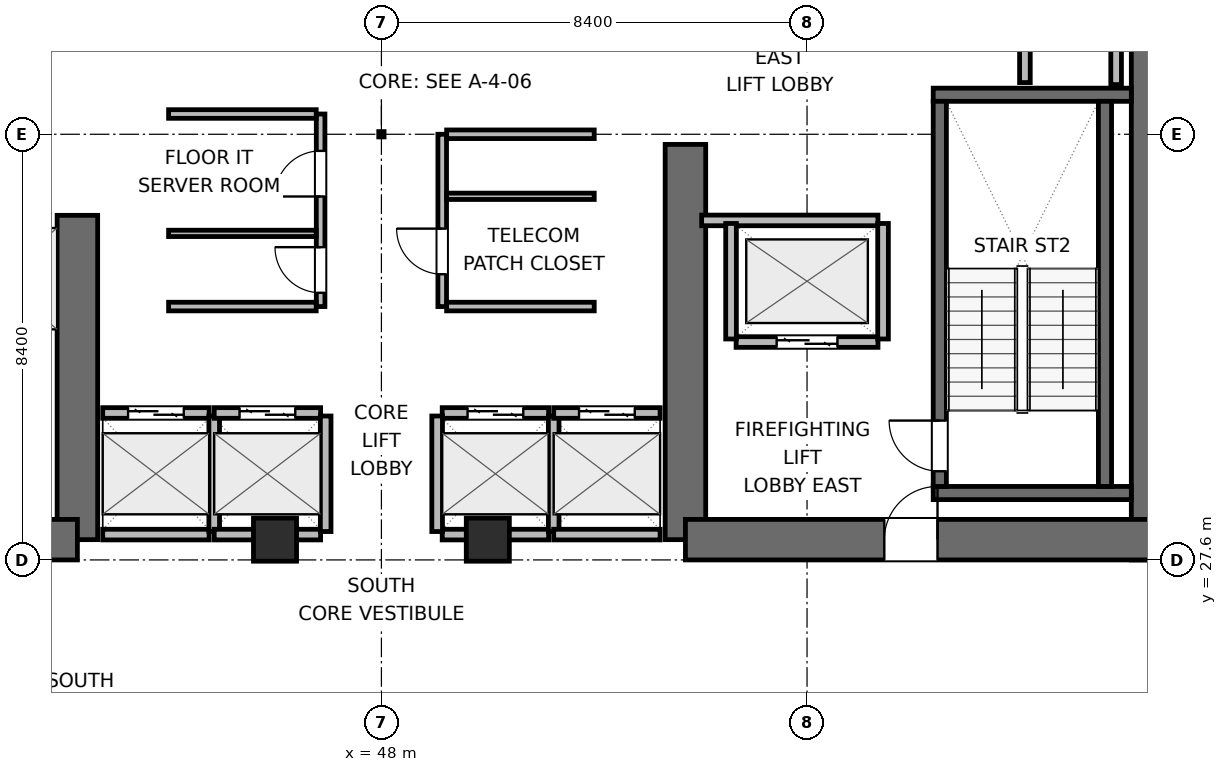
"""IFC4 building model, lengths in metres.
Left out: names, types, materials, properties, quantities, classifications, styles, units other than length and angle.
Written with IfcOpenShell. Run it as: python <this file> out.ifc"""

import sys

from ifc_helpers import new_model, si_unit, direction, frame, frame_2d, origin, origin_2d, place, context, subcontext, project, spatial, rectangle, extrude, element, fill, save


model = new_model("IFC4")
c1 = context("Model", 3, precision=1e-05, world=origin(), true_north=direction((0.0, 1.0)))
c2 = subcontext(c1, "Body", "Model", "MODEL_VIEW")
j1 = project(units=[si_unit("LENGTHUNIT", "METRE"), si_unit("PLANEANGLEUNIT", "RADIAN")], contexts=[c1])
p1 = place(None, origin())
s1 = spatial("IfcSite", under=j1, at=p1, CompositionType="ELEMENT")
p2 = place(p1, origin())
s2 = spatial("IfcBuilding", under=s1, at=p2, CompositionType="ELEMENT")
p3 = place(p2, frame((0.0, 0.0, 97.5)))
s3 = spatial("IfcBuildingStorey", under=s2, at=p3, CompositionType="ELEMENT", Elevation=97.5)
p4 = place(p3, frame((42.0, 28.0, 0.0), z_axis=(0.0, 0.0, 1.0), x_axis=(0.0, 1.0, 0.0)))
e1 = element("IfcWall", 1, at=p4, inside=s3, PredefinedType="SHEAR", context=c2, shape_type="SweptSolid", body=[
    extrude(rectangle(XDim=6.4, YDim=0.8, at=frame_2d((3.2, 0.0))), origin(), (0.0, 0.0, 1.0), 3.9),
])
p5 = place(p3, frame((32.8, 28.0, 0.0), z_axis=(0.0, 0.0, 1.0), x_axis=(1.0, 0.0, 0.0)))
e2 = element("IfcWall", 2, at=p5, inside=s3, PredefinedType="SHEAR", context=c2, shape_type="SweptSolid", body=[
    extrude(rectangle(XDim=9.2, YDim=0.8, at=frame_2d((4.6, 0.0))), origin(), (0.0, 0.0, 1.0), 3.9),
])
p6 = place(p5, frame((4.975, 0.0, 0.0)))
e3 = element("IfcOpeningElement", 3, at=p6, cuts=e2, PredefinedType="OPENING", context=c2, shape_type="SweptSolid", body=[
    extrude(rectangle(XDim=1.05, YDim=2.04, at=frame_2d((0.525, 1.02))), frame((0.0, 0.41, 0.0), z_axis=(0.0, -1.0, 0.0), x_axis=(1.0, 0.0, 0.0)), (0.0, 0.0, 1.0), 0.82),
])
p7 = place(p3, frame((54.0, 28.0, 0.0), z_axis=(0.0, 0.0, 1.0), x_axis=(0.0, 1.0, 0.0)))
e4 = element("IfcWall", 4, at=p7, inside=s3, PredefinedType="SHEAR", context=c2, shape_type="SweptSolid", body=[
    extrude(rectangle(XDim=7.8, YDim=0.8, at=frame_2d((3.9, 0.0))), origin(), (0.0, 0.0, 1.0), 3.9),
])
p8 = place(p3, frame((63.2, 27.6, 0.0), z_axis=(0.0, 0.0, 1.0), x_axis=(0.0, 1.0, 0.0)))
e5 = element("IfcWall", 5, at=p8, inside=s3, PredefinedType="SHEAR", context=c2, shape_type="SweptSolid", body=[
    extrude(rectangle(XDim=16.8, YDim=0.8, at=frame_2d((8.4, 0.0))), origin(), (0.0, 0.0, 1.0), 3.9),
])
p9 = place(p3, frame((54.0, 28.0, 0.0), z_axis=(0.0, 0.0, 1.0), x_axis=(1.0, 0.0, 0.0)))
e6 = element("IfcWall", 6, at=p9, inside=s3, PredefinedType="SHEAR", context=c2, shape_type="SweptSolid", body=[
    extrude(rectangle(XDim=9.2, YDim=0.8, at=frame_2d((4.6, 0.0))), origin(), (0.0, 0.0, 1.0), 3.9),
])
p10 = place(p9, frame((3.925, 0.0, 0.0)))
e7 = element("IfcOpeningElement", 7, at=p10, cuts=e6, PredefinedType="OPENING", context=c2, shape_type="SweptSolid", body=[
    extrude(rectangle(XDim=1.05, YDim=2.04, at=frame_2d((0.525, 1.02))), frame((0.0, 0.41, 0.0), z_axis=(0.0, -1.0, 0.0), x_axis=(1.0, 0.0, 0.0)), (0.0, 0.0, 1.0), 0.82),
])
for number, where, z_axis, x_axis in (
    (8, (58.89, 28.92, 0.0), (0.0, 0.0, 1.0), (1.0, 0.0, 0.0)),
    (9, (58.89, 36.78, 0.0), (0.0, 0.0, 1.0), (1.0, 0.0, 0.0)),
):
    element("IfcWall", number, at=place(p3, frame(where, z_axis=z_axis, x_axis=x_axis)), inside=s3, PredefinedType="SHEAR", context=c2, shape_type="SweptSolid", body=[
        extrude(rectangle(XDim=3.91, YDim=0.26, at=frame_2d((1.955, 0.0))), origin(), (0.0, 0.0, 1.0), 3.9),
    ])
p11 = place(p3, frame((59.02, 29.05, 0.0), z_axis=(0.0, 0.0, 1.0), x_axis=(0.0, 1.0, 0.0)))
e10 = element("IfcWall", 10, at=p11, inside=s3, PredefinedType="SHEAR", context=c2, shape_type="SweptSolid", body=[
    extrude(rectangle(XDim=7.6, YDim=0.26, at=frame_2d((3.8, 0.0))), origin(), (0.0, 0.0, 1.0), 3.9),
])
p12 = place(p11, frame((0.3, 0.0, 0.0)))
e11 = element("IfcOpeningElement", 11, at=p12, cuts=e10, PredefinedType="OPENING", context=c2, shape_type="SweptSolid", body=[
    extrude(rectangle(XDim=1.0, YDim=2.04, at=frame_2d((0.5, 1.02))), frame((0.0, 0.14, 0.0), z_axis=(0.0, -1.0, 0.0), x_axis=(1.0, 0.0, 0.0)), (0.0, 0.0, 1.0), 0.28),
])
p13 = place(p3, frame((62.28, 29.05, 0.0), z_axis=(0.0, 0.0, 1.0), x_axis=(0.0, 1.0, 0.0)))
e12 = element("IfcWall", 12, at=p13, inside=s3, PredefinedType="SHEAR", context=c2, shape_type="SweptSolid", body=[
    extrude(rectangle(XDim=7.6, YDim=0.26, at=frame_2d((3.8, 0.0))), origin(), (0.0, 0.0, 1.0), 3.9),
])
for number, where, z_axis, x_axis in (
    (13, (45.9, 28.0, 0.0), (0.0, 0.0, 1.0), (1.0, 0.0, 0.0)),
    (14, (50.1, 28.0, 0.0), (0.0, 0.0, 1.0), (1.0, 0.0, 0.0)),
):
    element("IfcColumn", number, at=place(p3, frame(where, z_axis=z_axis, x_axis=x_axis)), inside=s3, PredefinedType="COLUMN", context=c2, shape_type="SweptSolid", body=[
        extrude(rectangle(XDim=0.85, YDim=0.85, at=origin_2d()), origin(), (0.0, 0.0, 1.0), 3.9),
    ])
p14 = place(p3, frame((60.7, 37.02, 0.0), z_axis=(0.0, 0.0, 1.0), x_axis=(0.0, 1.0, 0.0)))
e15 = element("IfcWall", 15, at=p14, inside=s3, PredefinedType="PARTITIONING", context=c2, shape_type="SweptSolid", body=[
    extrude(rectangle(XDim=1.96, YDim=0.21, at=frame_2d((0.98, 0.0))), origin(), (0.0, 0.0, 1.0), 3.64),
])
p15 = place(p3, frame((62.5, 36.98, 0.0), z_axis=(0.0, 0.0, 1.0), x_axis=(0.0, 1.0, 0.0)))
e16 = element("IfcWall", 16, at=p15, inside=s3, PredefinedType="PARTITIONING", context=c2, shape_type="SweptSolid", body=[
    extrude(rectangle(XDim=2.04, YDim=0.21, at=frame_2d((1.02, 0.0))), origin(), (0.0, 0.0, 1.0), 3.64),
])
p16 = place(p3, frame((55.0, 31.9, 0.0), z_axis=(0.0, 0.0, 1.0), x_axis=(1.0, 0.0, 0.0)))
e17 = element("IfcWall", 17, at=p16, inside=s3, PredefinedType="PARTITIONING", context=c2, shape_type="SweptSolid", body=[
    extrude(rectangle(XDim=2.8, YDim=0.21, at=frame_2d((1.4, 0.0))), origin(), (0.0, 0.0, 1.0), 3.64),
])
p17 = place(p16, frame((0.8, 0.0, 0.0)))
e18 = element("IfcOpeningElement", 18, at=p17, cuts=e17, PredefinedType="OPENING", context=c2, shape_type="SweptSolid", body=[
    extrude(rectangle(XDim=1.2, YDim=2.04, at=frame_2d((0.6, 1.02))), frame((0.0, 0.115, 0.0), z_axis=(0.0, -1.0, 0.0), x_axis=(1.0, 0.0, 0.0)), (0.0, 0.0, 1.0), 0.23),
])
p18 = place(p3, frame((54.32, 34.3, 0.0), z_axis=(0.0, 0.0, 1.0), x_axis=(1.0, 0.0, 0.0)))
e19 = element("IfcWall", 19, at=p18, inside=s3, PredefinedType="PARTITIONING", context=c2, shape_type="SweptSolid", body=[
    extrude(rectangle(XDim=3.48, YDim=0.21, at=frame_2d((1.74, 0.0))), origin(), (0.0, 0.0, 1.0), 3.64),
])
for number, where, z_axis, x_axis in (
    (20, (54.9, 31.96, 0.0), (0.0, 0.0, 1.0), (0.0, 1.0, 0.0)),
    (21, (57.9, 31.96, 0.0), (0.0, 0.0, 1.0), (0.0, 1.0, 0.0)),
):
    element("IfcWall", number, at=place(p3, frame(where, z_axis=z_axis, x_axis=x_axis)), inside=s3, PredefinedType="PARTITIONING", context=c2, shape_type="SweptSolid", body=[
        extrude(rectangle(XDim=2.28, YDim=0.21, at=frame_2d((1.14, 0.0))), origin(), (0.0, 0.0, 1.0), 3.64),
    ])
p19 = place(p3, frame((42.5, 30.5, 0.0), z_axis=(0.0, 0.0, 1.0), x_axis=(1.0, 0.0, 0.0)))
e22 = element("IfcWall", 22, at=p19, inside=s3, PredefinedType="PARTITIONING", context=c2, shape_type="SweptSolid", body=[
    extrude(rectangle(XDim=2.1, YDim=0.21, at=frame_2d((1.05, 0.0))), origin(), (0.0, 0.0, 1.0), 3.64),
])
p20 = place(p19, frame((0.5, 0.0, 0.0)))
e23 = element("IfcOpeningElement", 23, at=p20, cuts=e22, PredefinedType="OPENING", context=c2, shape_type="SweptSolid", body=[
    extrude(rectangle(XDim=1.1, YDim=2.04, at=frame_2d((0.55, 1.02))), frame((0.0, 0.115, 0.0), z_axis=(0.0, -1.0, 0.0), x_axis=(1.0, 0.0, 0.0)), (0.0, 0.0, 1.0), 0.23),
])
p21 = place(p3, frame((42.5, 28.1, 0.0), z_axis=(0.0, 0.0, 1.0), x_axis=(1.0, 0.0, 0.0)))
e24 = element("IfcWall", 24, at=p21, inside=s3, PredefinedType="PARTITIONING", context=c2, shape_type="SweptSolid", body=[
    extrude(rectangle(XDim=2.1, YDim=0.21, at=frame_2d((1.05, 0.0))), origin(), (0.0, 0.0, 1.0), 2.525),
])
p22 = place(p3, frame((44.7, 28.16, 0.0), z_axis=(0.0, 0.0, 1.0), x_axis=(0.0, 1.0, 0.0)))
e25 = element("IfcWall", 25, at=p22, inside=s3, PredefinedType="PARTITIONING", context=c2, shape_type="SweptSolid", body=[
    extrude(rectangle(XDim=2.28, YDim=0.21, at=frame_2d((1.14, 0.0))), origin(), (0.0, 0.0, 1.0), 3.64),
])
p23 = place(p3, frame((44.7, 30.5, 0.0), z_axis=(0.0, 0.0, 1.0), x_axis=(1.0, 0.0, 0.0)))
e26 = element("IfcWall", 26, at=p23, inside=s3, PredefinedType="PARTITIONING", context=c2, shape_type="SweptSolid", body=[
    extrude(rectangle(XDim=2.1, YDim=0.21, at=frame_2d((1.05, 0.0))), origin(), (0.0, 0.0, 1.0), 3.64),
])
p24 = place(p23, frame((0.5, 0.0, 0.0)))
e27 = element("IfcOpeningElement", 27, at=p24, cuts=e26, PredefinedType="OPENING", context=c2, shape_type="SweptSolid", body=[
    extrude(rectangle(XDim=1.1, YDim=2.04, at=frame_2d((0.55, 1.02))), frame((0.0, 0.115, 0.0), z_axis=(0.0, -1.0, 0.0), x_axis=(1.0, 0.0, 0.0)), (0.0, 0.0, 1.0), 0.23),
])
p25 = place(p3, frame((44.7, 28.1, 0.0), z_axis=(0.0, 0.0, 1.0), x_axis=(1.0, 0.0, 0.0)))
e28 = element("IfcWall", 28, at=p25, inside=s3, PredefinedType="PARTITIONING", context=c2, shape_type="SweptSolid", body=[
    extrude(rectangle(XDim=2.1, YDim=0.21, at=frame_2d((1.05, 0.0))), origin(), (0.0, 0.0, 1.0), 2.525),
])
p26 = place(p3, frame((46.9, 28.16, 0.0), z_axis=(0.0, 0.0, 1.0), x_axis=(0.0, 1.0, 0.0)))
e29 = element("IfcWall", 29, at=p26, inside=s3, PredefinedType="PARTITIONING", context=c2, shape_type="SweptSolid", body=[
    extrude(rectangle(XDim=2.28, YDim=0.21, at=frame_2d((1.14, 0.0))), origin(), (0.0, 0.0, 1.0), 3.64),
])
p27 = place(p3, frame((49.2, 30.5, 0.0), z_axis=(0.0, 0.0, 1.0), x_axis=(1.0, 0.0, 0.0)))
e30 = element("IfcWall", 30, at=p27, inside=s3, PredefinedType="PARTITIONING", context=c2, shape_type="SweptSolid", body=[
    extrude(rectangle(XDim=2.1, YDim=0.21, at=frame_2d((1.05, 0.0))), origin(), (0.0, 0.0, 1.0), 3.64),
])
p28 = place(p27, frame((0.5, 0.0, 0.0)))
e31 = element("IfcOpeningElement", 31, at=p28, cuts=e30, PredefinedType="OPENING", context=c2, shape_type="SweptSolid", body=[
    extrude(rectangle(XDim=1.1, YDim=2.04, at=frame_2d((0.55, 1.02))), frame((0.0, 0.115, 0.0), z_axis=(0.0, -1.0, 0.0), x_axis=(1.0, 0.0, 0.0)), (0.0, 0.0, 1.0), 0.23),
])
p29 = place(p3, frame((49.2, 28.1, 0.0), z_axis=(0.0, 0.0, 1.0), x_axis=(1.0, 0.0, 0.0)))
e32 = element("IfcWall", 32, at=p29, inside=s3, PredefinedType="PARTITIONING", context=c2, shape_type="SweptSolid", body=[
    extrude(rectangle(XDim=2.1, YDim=0.21, at=frame_2d((1.05, 0.0))), origin(), (0.0, 0.0, 1.0), 2.525),
])
for number, where, z_axis, x_axis in (
    (33, (49.1, 28.16, 0.0), (0.0, 0.0, 1.0), (0.0, 1.0, 0.0)),
    (34, (51.4, 28.16, 0.0), (0.0, 0.0, 1.0), (0.0, 1.0, 0.0)),
):
    element("IfcWall", number, at=place(p3, frame(where, z_axis=z_axis, x_axis=x_axis)), inside=s3, PredefinedType="PARTITIONING", context=c2, shape_type="SweptSolid", body=[
        extrude(rectangle(XDim=2.28, YDim=0.21, at=frame_2d((1.14, 0.0))), origin(), (0.0, 0.0, 1.0), 3.64),
    ])
p30 = place(p3, frame((51.4, 30.5, 0.0), z_axis=(0.0, 0.0, 1.0), x_axis=(1.0, 0.0, 0.0)))
e35 = element("IfcWall", 35, at=p30, inside=s3, PredefinedType="PARTITIONING", context=c2, shape_type="SweptSolid", body=[
    extrude(rectangle(XDim=2.1, YDim=0.21, at=frame_2d((1.05, 0.0))), origin(), (0.0, 0.0, 1.0), 3.64),
])
p31 = place(p30, frame((0.5, 0.0, 0.0)))
e36 = element("IfcOpeningElement", 36, at=p31, cuts=e35, PredefinedType="OPENING", context=c2, shape_type="SweptSolid", body=[
    extrude(rectangle(XDim=1.1, YDim=2.04, at=frame_2d((0.55, 1.02))), frame((0.0, 0.115, 0.0), z_axis=(0.0, -1.0, 0.0), x_axis=(1.0, 0.0, 0.0)), (0.0, 0.0, 1.0), 0.23),
])
p32 = place(p3, frame((51.4, 28.1, 0.0), z_axis=(0.0, 0.0, 1.0), x_axis=(1.0, 0.0, 0.0)))
e37 = element("IfcWall", 37, at=p32, inside=s3, PredefinedType="PARTITIONING", context=c2, shape_type="SweptSolid", body=[
    extrude(rectangle(XDim=2.1, YDim=0.21, at=frame_2d((1.05, 0.0))), origin(), (0.0, 0.0, 1.0), 2.525),
])
p33 = place(p3, frame((46.8, 32.6, 0.0), z_axis=(0.0, 0.0, 1.0), x_axis=(0.0, 1.0, 0.0)))
e38 = element("IfcWall", 38, at=p33, inside=s3, PredefinedType="PARTITIONING", context=c2, shape_type="SweptSolid", body=[
    extrude(rectangle(XDim=3.8, YDim=0.17, at=frame_2d((1.9, 0.0))), origin(), (0.0, 0.0, 1.0), 3.64),
])
p34 = place(p33, frame((0.272, 0.0, 0.0)))
e39 = element("IfcOpeningElement", 39, at=p34, cuts=e38, PredefinedType="OPENING", context=c2, shape_type="SweptSolid", body=[
    extrude(rectangle(XDim=0.9, YDim=2.02, at=frame_2d((0.45, 1.01))), frame((0.0, 0.095, 0.0), z_axis=(0.0, -1.0, 0.0), x_axis=(1.0, 0.0, 0.0)), (0.0, 0.0, 1.0), 0.19),
])
p35 = place(p33, frame((2.172, 0.0, 0.0)))
e40 = element("IfcOpeningElement", 40, at=p35, cuts=e38, PredefinedType="OPENING", context=c2, shape_type="SweptSolid", body=[
    extrude(rectangle(XDim=0.9, YDim=2.02, at=frame_2d((0.45, 1.01))), frame((0.0, 0.095, 0.0), z_axis=(0.0, -1.0, 0.0), x_axis=(1.0, 0.0, 0.0)), (0.0, 0.0, 1.0), 0.19),
])
for number, where, z_axis, x_axis in (
    (41, (43.8, 32.6, 0.0), (0.0, 0.0, 1.0), (1.0, 0.0, 0.0)),
    (42, (43.8, 36.4, 0.0), (0.0, 0.0, 1.0), (1.0, 0.0, 0.0)),
):
    element("IfcWall", number, at=place(p3, frame(where, z_axis=z_axis, x_axis=x_axis)), inside=s3, PredefinedType="PARTITIONING", context=c2, shape_type="SweptSolid", body=[
        extrude(rectangle(XDim=2.913, YDim=0.17, at=frame_2d((1.457, 0.0))), origin(), (0.0, 0.0, 1.0), 3.64),
    ])
p36 = place(p3, frame((43.8, 34.044, 0.0), z_axis=(0.0, 0.0, 1.0), x_axis=(1.0, 0.0, 0.0)))
e43 = element("IfcWall", 43, at=p36, inside=s3, PredefinedType="PARTITIONING", context=c2, shape_type="SweptSolid", body=[
    extrude(rectangle(XDim=2.913, YDim=0.125, at=frame_2d((1.457, 0.0))), origin(), (0.0, 0.0, 1.0), 3.64),
])
p37 = place(p3, frame((49.2, 32.6, 0.0), z_axis=(0.0, 0.0, 1.0), x_axis=(0.0, 1.0, 0.0)))
e44 = element("IfcWall", 44, at=p37, inside=s3, PredefinedType="PARTITIONING", context=c2, shape_type="SweptSolid", body=[
    extrude(rectangle(XDim=3.4, YDim=0.17, at=frame_2d((1.7, 0.0))), origin(), (0.0, 0.0, 1.0), 3.64),
])
p38 = place(p37, frame((0.638, 0.0, 0.0)))
e45 = element("IfcOpeningElement", 45, at=p38, cuts=e44, PredefinedType="OPENING", context=c2, shape_type="SweptSolid", body=[
    extrude(rectangle(XDim=0.9, YDim=2.02, at=frame_2d((0.45, 1.01))), frame((0.0, 0.095, 0.0), z_axis=(0.0, -1.0, 0.0), x_axis=(1.0, 0.0, 0.0)), (0.0, 0.0, 1.0), 0.19),
])
for number, where, z_axis, x_axis in (
    (46, (49.287, 32.6, 0.0), (0.0, 0.0, 1.0), (1.0, 0.0, 0.0)),
    (47, (49.287, 36.0, 0.0), (0.0, 0.0, 1.0), (1.0, 0.0, 0.0)),
):
    element("IfcWall", number, at=place(p3, frame(where, z_axis=z_axis, x_axis=x_axis)), inside=s3, PredefinedType="PARTITIONING", context=c2, shape_type="SweptSolid", body=[
        extrude(rectangle(XDim=2.913, YDim=0.17, at=frame_2d((1.457, 0.0))), origin(), (0.0, 0.0, 1.0), 3.64),
    ])
p39 = place(p3, frame((49.287, 34.776, 0.0), z_axis=(0.0, 0.0, 1.0), x_axis=(1.0, 0.0, 0.0)))
e48 = element("IfcWall", 48, at=p39, inside=s3, PredefinedType="PARTITIONING", context=c2, shape_type="SweptSolid", body=[
    extrude(rectangle(XDim=2.913, YDim=0.125, at=frame_2d((1.457, 0.0))), origin(), (0.0, 0.0, 1.0), 3.64),
])
p40 = place(p12, origin())
e49 = element("IfcDoor", 49, at=p40, inside=s3, OperationType="SINGLE_SWING_RIGHT", PredefinedType="DOOR", context=c2, shape_type="SweptSolid", body=[
    extrude(rectangle(XDim=1.0, YDim=2.04, at=frame_2d((0.5, 1.02))), frame((0.0, 0.025, 0.0), z_axis=(0.0, -1.0, 0.0), x_axis=(1.0, 0.0, 0.0)), (0.0, 0.0, 1.0), 0.05),
])
fill(e11, e49)
p41 = place(p17, origin())
e50 = element("IfcDoor", 50, at=p41, inside=s3, OperationType="DOUBLE_DOOR_SLIDING", PredefinedType="DOOR", context=c2, shape_type="SweptSolid", body=[
    extrude(rectangle(XDim=1.2, YDim=2.04, at=frame_2d((0.6, 1.02))), frame((0.0, 0.025, 0.0), z_axis=(0.0, -1.0, 0.0), x_axis=(1.0, 0.0, 0.0)), (0.0, 0.0, 1.0), 0.05),
])
fill(e18, e50)
p42 = place(p20, origin())
e51 = element("IfcDoor", 51, at=p42, inside=s3, OperationType="DOUBLE_DOOR_SLIDING", PredefinedType="DOOR", context=c2, shape_type="SweptSolid", body=[
    extrude(rectangle(XDim=1.1, YDim=2.04, at=frame_2d((0.55, 1.02))), frame((0.0, 0.025, 0.0), z_axis=(0.0, -1.0, 0.0), x_axis=(1.0, 0.0, 0.0)), (0.0, 0.0, 1.0), 0.05),
])
fill(e23, e51)
p43 = place(p24, origin())
e52 = element("IfcDoor", 52, at=p43, inside=s3, OperationType="DOUBLE_DOOR_SLIDING", PredefinedType="DOOR", context=c2, shape_type="SweptSolid", body=[
    extrude(rectangle(XDim=1.1, YDim=2.04, at=frame_2d((0.55, 1.02))), frame((0.0, 0.025, 0.0), z_axis=(0.0, -1.0, 0.0), x_axis=(1.0, 0.0, 0.0)), (0.0, 0.0, 1.0), 0.05),
])
fill(e27, e52)
p44 = place(p28, origin())
e53 = element("IfcDoor", 53, at=p44, inside=s3, OperationType="DOUBLE_DOOR_SLIDING", PredefinedType="DOOR", context=c2, shape_type="SweptSolid", body=[
    extrude(rectangle(XDim=1.1, YDim=2.04, at=frame_2d((0.55, 1.02))), frame((0.0, 0.025, 0.0), z_axis=(0.0, -1.0, 0.0), x_axis=(1.0, 0.0, 0.0)), (0.0, 0.0, 1.0), 0.05),
])
fill(e31, e53)
p45 = place(p31, origin())
e54 = element("IfcDoor", 54, at=p45, inside=s3, OperationType="DOUBLE_DOOR_SLIDING", PredefinedType="DOOR", context=c2, shape_type="SweptSolid", body=[
    extrude(rectangle(XDim=1.1, YDim=2.04, at=frame_2d((0.55, 1.02))), frame((0.0, 0.025, 0.0), z_axis=(0.0, -1.0, 0.0), x_axis=(1.0, 0.0, 0.0)), (0.0, 0.0, 1.0), 0.05),
])
fill(e36, e54)
p46 = place(p10, origin())
e55 = element("IfcDoor", 55, at=p46, inside=s3, OperationType="SINGLE_SWING_RIGHT", PredefinedType="DOOR", context=c2, shape_type="SweptSolid", body=[
    extrude(rectangle(XDim=1.05, YDim=2.04, at=frame_2d((0.525, 1.02))), frame((0.0, 0.025, 0.0), z_axis=(0.0, -1.0, 0.0), x_axis=(1.0, 0.0, 0.0)), (0.0, 0.0, 1.0), 0.05),
])
fill(e7, e55)
p47 = place(p34, origin())
e56 = element("IfcDoor", 56, at=p47, inside=s3, OperationType="SINGLE_SWING_RIGHT", PredefinedType="DOOR", context=c2, shape_type="SweptSolid", body=[
    extrude(rectangle(XDim=0.9, YDim=2.02, at=frame_2d((0.45, 1.01))), frame((0.0, 0.025, 0.0), z_axis=(0.0, -1.0, 0.0), x_axis=(1.0, 0.0, 0.0)), (0.0, 0.0, 1.0), 0.05),
])
fill(e39, e56)
p48 = place(p35, origin())
e57 = element("IfcDoor", 57, at=p48, inside=s3, OperationType="SINGLE_SWING_LEFT", PredefinedType="DOOR", context=c2, shape_type="SweptSolid", body=[
    extrude(rectangle(XDim=0.9, YDim=2.02, at=frame_2d((0.45, 1.01))), frame((0.0, 0.025, 0.0), z_axis=(0.0, -1.0, 0.0), x_axis=(1.0, 0.0, 0.0)), (0.0, 0.0, 1.0), 0.05),
])
fill(e40, e57)
p49 = place(p38, origin())
e58 = element("IfcDoor", 58, at=p49, inside=s3, OperationType="SINGLE_SWING_RIGHT", PredefinedType="DOOR", context=c2, shape_type="SweptSolid", body=[
    extrude(rectangle(XDim=0.9, YDim=2.02, at=frame_2d((0.45, 1.01))), frame((0.0, 0.025, 0.0), z_axis=(0.0, -1.0, 0.0), x_axis=(1.0, 0.0, 0.0)), (0.0, 0.0, 1.0), 0.05),
])
fill(e45, e58)
save(model, sys.argv[1])
